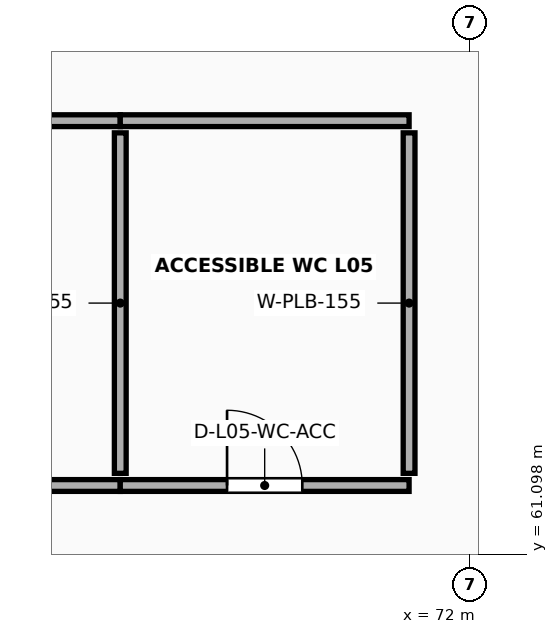
"""IFC4 building model, lengths in metres.
Left out: names, types, materials, properties, quantities, classifications, styles, units other than length and angle.
Written with IfcOpenShell. Run it as: python <this file> out.ifc"""

import sys

from ifc_helpers import new_model, si_unit, direction, frame, frame_2d, origin, place, context, subcontext, project, spatial, rectangle, extrude, element, fill, save


model = new_model("IFC4")
c1 = context("Model", 3, precision=1e-05, world=origin(), true_north=direction((0.0, 1.0)))
c2 = subcontext(c1, "Body", "Model", "MODEL_VIEW")
j1 = project(units=[si_unit("LENGTHUNIT", "METRE"), si_unit("PLANEANGLEUNIT", "RADIAN")], contexts=[c1])
p1 = place(None, origin())
s1 = spatial("IfcSite", under=j1, at=p1, CompositionType="ELEMENT")
p2 = place(p1, origin())
s2 = spatial("IfcBuilding", under=s1, at=p2, CompositionType="ELEMENT")
p3 = place(p2, frame((0.0, 0.0, 21.0)))
s3 = spatial("IfcBuildingStorey", under=s2, at=p3, CompositionType="ELEMENT", Elevation=21.0)
p4 = place(p3, frame((62.0, 62.0, 0.0), z_axis=(0.0, 0.0, 1.0), x_axis=(1.0, 0.0, 0.0)))
e1 = element("IfcWall", 1, at=p4, inside=s3, PredefinedType="PLUMBINGWALL", context=c2, shape_type="SweptSolid", body=[
    extrude(rectangle(XDim=5.4, YDim=0.155, at=frame_2d((2.7, 0.0))), origin(), (0.0, 0.0, 1.0), 2.75),
])
p5 = place(p4, frame((2.225, 0.0, 0.0)))
e2 = element("IfcOpeningElement", 2, at=p5, cuts=e1, PredefinedType="OPENING", context=c2, shape_type="SweptSolid", body=[
    extrude(rectangle(XDim=0.95, YDim=2.13, at=frame_2d((0.475, 1.065))), frame((0.0, 0.093, 0.0), z_axis=(0.0, -1.0, 0.0), x_axis=(1.0, 0.0, 0.0)), (0.0, 0.0, 1.0), 0.185),
])
p6 = place(p3, frame((62.0, 66.8, 0.0), z_axis=(0.0, 0.0, 1.0), x_axis=(1.0, 0.0, 0.0)))
e3 = element("IfcWall", 3, at=p6, inside=s3, PredefinedType="PLUMBINGWALL", context=c2, shape_type="SweptSolid", body=[
    extrude(rectangle(XDim=5.4, YDim=0.155, at=frame_2d((2.7, 0.0))), origin(), (0.0, 0.0, 1.0), 2.75),
])
p7 = place(p3, frame((67.4, 62.16, 0.0), z_axis=(0.0, 0.0, 1.0), x_axis=(0.0, 1.0, 0.0)))
e4 = element("IfcWall", 4, at=p7, inside=s3, PredefinedType="PLUMBINGWALL", context=c2, shape_type="SweptSolid", body=[
    extrude(rectangle(XDim=4.48, YDim=0.155, at=frame_2d((2.24, 0.0))), origin(), (0.0, 0.0, 1.0), 2.75),
])
p8 = place(p3, frame((67.4, 62.0, 0.0), z_axis=(0.0, 0.0, 1.0), x_axis=(1.0, 0.0, 0.0)))
e5 = element("IfcWall", 5, at=p8, inside=s3, PredefinedType="PLUMBINGWALL", context=c2, shape_type="SweptSolid", body=[
    extrude(rectangle(XDim=3.8, YDim=0.155, at=frame_2d((1.9, 0.0))), origin(), (0.0, 0.0, 1.0), 2.75),
])
p9 = place(p8, frame((1.405, 0.0, 0.0)))
e6 = element("IfcOpeningElement", 6, at=p9, cuts=e5, PredefinedType="OPENING", context=c2, shape_type="SweptSolid", body=[
    extrude(rectangle(XDim=0.99, YDim=2.15, at=frame_2d((0.495, 1.075))), frame((0.0, 0.093, 0.0), z_axis=(0.0, -1.0, 0.0), x_axis=(1.0, 0.0, 0.0)), (0.0, 0.0, 1.0), 0.185),
])
p10 = place(p3, frame((67.4, 66.8, 0.0), z_axis=(0.0, 0.0, 1.0), x_axis=(1.0, 0.0, 0.0)))
e7 = element("IfcWall", 7, at=p10, inside=s3, PredefinedType="PLUMBINGWALL", context=c2, shape_type="SweptSolid", body=[
    extrude(rectangle(XDim=3.8, YDim=0.155, at=frame_2d((1.9, 0.0))), origin(), (0.0, 0.0, 1.0), 2.75),
])
p11 = place(p3, frame((71.2, 62.16, 0.0), z_axis=(0.0, 0.0, 1.0), x_axis=(0.0, 1.0, 0.0)))
e8 = element("IfcWall", 8, at=p11, inside=s3, PredefinedType="PLUMBINGWALL", context=c2, shape_type="SweptSolid", body=[
    extrude(rectangle(XDim=4.48, YDim=0.155, at=frame_2d((2.24, 0.0))), origin(), (0.0, 0.0, 1.0), 2.75),
])
p12 = place(p9, origin())
e9 = element("IfcDoor", 9, at=p12, inside=s3, OperationType="SINGLE_SWING_LEFT", PredefinedType="DOOR", context=c2, shape_type="SweptSolid", body=[
    extrude(rectangle(XDim=0.99, YDim=2.15, at=frame_2d((0.495, 1.075))), frame((0.0, 0.025, 0.0), z_axis=(0.0, -1.0, 0.0), x_axis=(1.0, 0.0, 0.0)), (0.0, 0.0, 1.0), 0.05),
])
fill(e6, e9)
save(model, sys.argv[1])
